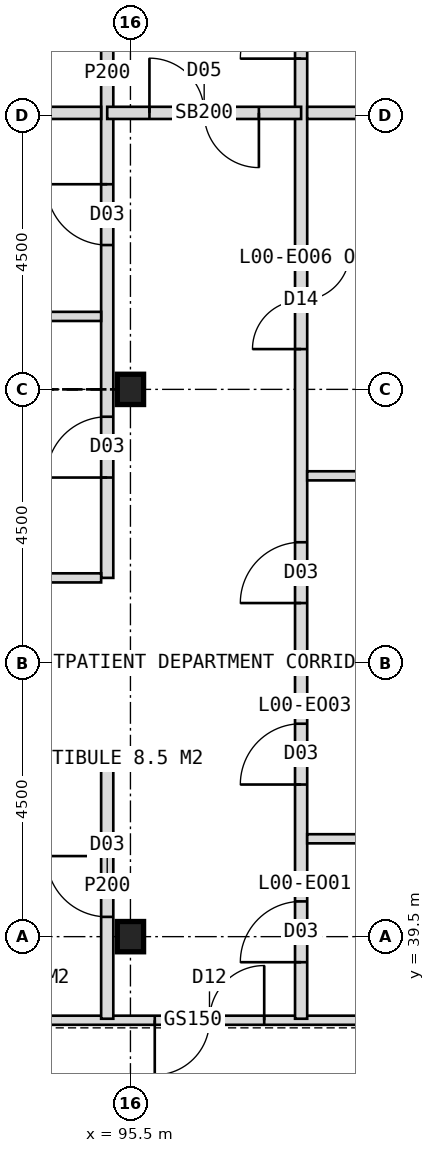
"""IFC4 building model, lengths in metres.
Left out: names, types, materials, properties, quantities, classifications, styles, units other than length and angle.
Written with IfcOpenShell. Run it as: python <this file> out.ifc"""

import sys

from ifc_helpers import new_model, si_unit, direction, frame, frame_2d, origin, origin_2d, place, context, subcontext, project, spatial, rectangle, i_section, extrude, element, fill, save


model = new_model("IFC4")
c1 = context("Model", 3, precision=1e-05, world=origin(), true_north=direction((0.0, 1.0)))
c2 = subcontext(c1, "Body", "Model", "MODEL_VIEW")
j1 = project(units=[si_unit("LENGTHUNIT", "METRE"), si_unit("PLANEANGLEUNIT", "RADIAN")], contexts=[c1])
p1 = place(None, origin())
s1 = spatial("IfcSite", under=j1, at=p1, CompositionType="ELEMENT")
p2 = place(p1, origin())
s2 = spatial("IfcBuilding", under=s1, at=p2, CompositionType="ELEMENT")
p3 = place(p2, origin())
s3 = spatial("IfcBuildingStorey", under=s2, at=p3, CompositionType="ELEMENT", Elevation=0.0)
for number, where, z_axis, x_axis in (
    (1, (95.5, 39.5, 0.0), (0.0, 0.0, 1.0), (1.0, 0.0, 0.0)),
    (2, (95.5, 48.5, 0.0), (0.0, 0.0, 1.0), (1.0, 0.0, 0.0)),
):
    element("IfcColumn", number, at=place(p3, frame(where, z_axis=z_axis, x_axis=x_axis)), inside=s3, PredefinedType="COLUMN", context=c2, shape_type="SweptSolid", body=[
        extrude(i_section(OverallWidth=0.432, OverallDepth=0.498, WebThickness=0.056, FlangeThickness=0.089, FilletRadius=0.015, at=origin_2d()), origin(), (0.0, 0.0, 1.0), 6.0),
    ])
p4 = place(p3, frame((86.5, 38.125, 0.0), z_axis=(0.0, 0.0, 1.0), x_axis=(1.0, 0.0, 0.0)))
e3 = element("IfcWall", 3, at=p4, inside=s3, PredefinedType="STANDARD", context=c2, shape_type="SweptSolid", body=[
    extrude(rectangle(XDim=20.053, YDim=0.15, at=frame_2d((10.027, 0.0))), origin(), (0.0, 0.0, 1.0), 5.1),
])
p5 = place(p4, frame((9.4, 0.0, 0.0)))
e4 = element("IfcOpeningElement", 4, at=p5, cuts=e3, PredefinedType="OPENING", context=c2, shape_type="SweptSolid", body=[
    extrude(rectangle(XDim=1.8, YDim=2.4, at=frame_2d((0.9, 1.2))), frame((0.0, 0.085, 0.0), z_axis=(0.0, -1.0, 0.0), x_axis=(1.0, 0.0, 0.0)), (0.0, 0.0, 1.0), 0.17),
])
p6 = place(p4, frame((0.322, 0.0, 0.6)))
e5 = element("IfcOpeningElement", 5, at=p6, cuts=e3, PredefinedType="OPENING", context=c2, shape_type="SweptSolid", body=[
    extrude(rectangle(XDim=2.4, YDim=3.0, at=frame_2d((1.2, 1.5))), frame((0.0, 0.085, 0.0), z_axis=(0.0, -1.0, 0.0), x_axis=(1.0, 0.0, 0.0)), (0.0, 0.0, 1.0), 0.17),
])
p7 = place(p4, frame((12.919, 0.0, 0.6)))
e6 = element("IfcOpeningElement", 6, at=p7, cuts=e3, PredefinedType="OPENING", context=c2, shape_type="SweptSolid", body=[
    extrude(rectangle(XDim=2.4, YDim=3.0, at=frame_2d((1.2, 1.5))), frame((0.0, 0.085, 0.0), z_axis=(0.0, -1.0, 0.0), x_axis=(1.0, 0.0, 0.0)), (0.0, 0.0, 1.0), 0.17),
])
p8 = place(p4, frame((17.654, 0.0, 0.6)))
e7 = element("IfcOpeningElement", 7, at=p8, cuts=e3, PredefinedType="OPENING", context=c2, shape_type="SweptSolid", body=[
    extrude(rectangle(XDim=2.4, YDim=3.0, at=frame_2d((1.2, 1.5))), frame((0.0, 0.085, 0.0), z_axis=(0.0, -1.0, 0.0), x_axis=(1.0, 0.0, 0.0)), (0.0, 0.0, 1.0), 0.17),
])
p9 = place(p3, frame((98.307, 38.15, 0.0), z_axis=(0.0, 0.0, 1.0), x_axis=(0.0, 1.0, 0.0)))
e8 = element("IfcWall", 8, at=p9, inside=s3, PredefinedType="PARTITIONING", context=c2, shape_type="SweptSolid", body=[
    extrude(rectangle(XDim=47.7, YDim=0.2, at=frame_2d((23.85, 0.0))), origin(), (0.0, 0.0, 1.0), 5.7),
])
p10 = place(p9, frame((45.7, 0.0, 0.0)))
e9 = element("IfcOpeningElement", 9, at=p10, cuts=e8, PredefinedType="OPENING", context=c2, shape_type="SweptSolid", body=[
    extrude(rectangle(XDim=1.2, YDim=2.1, at=frame_2d((0.6, 1.05))), frame((0.0, 0.11, 0.0), z_axis=(0.0, -1.0, 0.0), x_axis=(1.0, 0.0, 0.0)), (0.0, 0.0, 1.0), 0.22),
])
p11 = place(p9, frame((36.244, 0.0, 0.0)))
e10 = element("IfcOpeningElement", 10, at=p11, cuts=e8, PredefinedType="OPENING", context=c2, shape_type="SweptSolid", body=[
    extrude(rectangle(XDim=1.0, YDim=2.1, at=frame_2d((0.5, 1.05))), frame((0.0, 0.11, 0.0), z_axis=(0.0, -1.0, 0.0), x_axis=(1.0, 0.0, 0.0)), (0.0, 0.0, 1.0), 0.22),
])
p12 = place(p9, frame((0.93, 0.0, 0.0)))
e11 = element("IfcOpeningElement", 11, at=p12, cuts=e8, PredefinedType="OPENING", context=c2, shape_type="SweptSolid", body=[
    extrude(rectangle(XDim=1.0, YDim=2.1, at=frame_2d((0.5, 1.05))), frame((0.0, 0.11, 0.0), z_axis=(0.0, -1.0, 0.0), x_axis=(1.0, 0.0, 0.0)), (0.0, 0.0, 1.0), 0.22),
])
p13 = place(p9, frame((3.852, 0.0, 0.0)))
e12 = element("IfcOpeningElement", 12, at=p13, cuts=e8, PredefinedType="OPENING", context=c2, shape_type="SweptSolid", body=[
    extrude(rectangle(XDim=1.0, YDim=2.1, at=frame_2d((0.5, 1.05))), frame((0.0, 0.11, 0.0), z_axis=(0.0, -1.0, 0.0), x_axis=(1.0, 0.0, 0.0)), (0.0, 0.0, 1.0), 0.22),
])
p14 = place(p9, frame((6.836, 0.0, 0.0)))
e13 = element("IfcOpeningElement", 13, at=p14, cuts=e8, PredefinedType="OPENING", context=c2, shape_type="SweptSolid", body=[
    extrude(rectangle(XDim=1.0, YDim=2.1, at=frame_2d((0.5, 1.05))), frame((0.0, 0.11, 0.0), z_axis=(0.0, -1.0, 0.0), x_axis=(1.0, 0.0, 0.0)), (0.0, 0.0, 1.0), 0.22),
])
p15 = place(p9, frame((11.012, 0.0, 0.0)))
e14 = element("IfcOpeningElement", 14, at=p15, cuts=e8, PredefinedType="OPENING", context=c2, shape_type="SweptSolid", body=[
    extrude(rectangle(XDim=1.6, YDim=2.2, at=frame_2d((0.8, 1.1))), frame((0.0, 0.11, 0.0), z_axis=(0.0, -1.0, 0.0), x_axis=(1.0, 0.0, 0.0)), (0.0, 0.0, 1.0), 0.22),
])
p16 = place(p9, frame((15.789, 0.0, 0.0)))
e15 = element("IfcOpeningElement", 15, at=p16, cuts=e8, PredefinedType="OPENING", context=c2, shape_type="SweptSolid", body=[
    extrude(rectangle(XDim=1.0, YDim=2.1, at=frame_2d((0.5, 1.05))), frame((0.0, 0.11, 0.0), z_axis=(0.0, -1.0, 0.0), x_axis=(1.0, 0.0, 0.0)), (0.0, 0.0, 1.0), 0.22),
])
p17 = place(p9, frame((18.773, 0.0, 0.0)))
e16 = element("IfcOpeningElement", 16, at=p17, cuts=e8, PredefinedType="OPENING", context=c2, shape_type="SweptSolid", body=[
    extrude(rectangle(XDim=1.0, YDim=2.1, at=frame_2d((0.5, 1.05))), frame((0.0, 0.11, 0.0), z_axis=(0.0, -1.0, 0.0), x_axis=(1.0, 0.0, 0.0)), (0.0, 0.0, 1.0), 0.22),
])
p18 = place(p9, frame((22.95, 0.0, 0.0)))
e17 = element("IfcOpeningElement", 17, at=p18, cuts=e8, PredefinedType="OPENING", context=c2, shape_type="SweptSolid", body=[
    extrude(rectangle(XDim=1.6, YDim=2.2, at=frame_2d((0.8, 1.1))), frame((0.0, 0.11, 0.0), z_axis=(0.0, -1.0, 0.0), x_axis=(1.0, 0.0, 0.0)), (0.0, 0.0, 1.0), 0.22),
])
p19 = place(p9, frame((27.727, 0.0, 0.0)))
e18 = element("IfcOpeningElement", 18, at=p19, cuts=e8, PredefinedType="OPENING", context=c2, shape_type="SweptSolid", body=[
    extrude(rectangle(XDim=1.0, YDim=2.1, at=frame_2d((0.5, 1.05))), frame((0.0, 0.11, 0.0), z_axis=(0.0, -1.0, 0.0), x_axis=(1.0, 0.0, 0.0)), (0.0, 0.0, 1.0), 0.22),
])
p20 = place(p9, frame((30.711, 0.0, 0.0)))
e19 = element("IfcOpeningElement", 19, at=p20, cuts=e8, PredefinedType="OPENING", context=c2, shape_type="SweptSolid", body=[
    extrude(rectangle(XDim=1.0, YDim=2.1, at=frame_2d((0.5, 1.05))), frame((0.0, 0.11, 0.0), z_axis=(0.0, -1.0, 0.0), x_axis=(1.0, 0.0, 0.0)), (0.0, 0.0, 1.0), 0.22),
])
p21 = place(p9, frame((33.695, 0.0, 0.0)))
e20 = element("IfcOpeningElement", 20, at=p21, cuts=e8, PredefinedType="OPENING", context=c2, shape_type="SweptSolid", body=[
    extrude(rectangle(XDim=1.0, YDim=2.1, at=frame_2d((0.5, 1.05))), frame((0.0, 0.11, 0.0), z_axis=(0.0, -1.0, 0.0), x_axis=(1.0, 0.0, 0.0)), (0.0, 0.0, 1.0), 0.22),
])
p22 = place(p3, frame((95.118, 38.15, 0.0), z_axis=(0.0, 0.0, 1.0), x_axis=(0.0, 1.0, 0.0)))
e21 = element("IfcWall", 21, at=p22, inside=s3, PredefinedType="PARTITIONING", context=c2, shape_type="SweptSolid", body=[
    extrude(rectangle(XDim=4.35, YDim=0.2, at=frame_2d((2.175, 0.0))), origin(), (0.0, 0.0, 1.0), 5.7),
])
p23 = place(p22, frame((1.675, 0.0, 0.0)))
e22 = element("IfcOpeningElement", 22, at=p23, cuts=e21, PredefinedType="OPENING", context=c2, shape_type="SweptSolid", body=[
    extrude(rectangle(XDim=1.0, YDim=2.1, at=frame_2d((0.5, 1.05))), frame((0.0, 0.11, 0.0), z_axis=(0.0, -1.0, 0.0), x_axis=(1.0, 0.0, 0.0)), (0.0, 0.0, 1.0), 0.22),
])
p24 = place(p3, frame((95.118, 45.4, 0.0), z_axis=(0.0, 0.0, 1.0), x_axis=(0.0, 1.0, 0.0)))
e23 = element("IfcWall", 23, at=p24, inside=s3, PredefinedType="PARTITIONING", context=c2, shape_type="SweptSolid", body=[
    extrude(rectangle(XDim=16.6, YDim=0.2, at=frame_2d((8.3, 0.0))), origin(), (0.0, 0.0, 1.0), 5.7),
])
p25 = place(p24, frame((1.65, 0.0, 0.0)))
e24 = element("IfcOpeningElement", 24, at=p25, cuts=e23, PredefinedType="OPENING", context=c2, shape_type="SweptSolid", body=[
    extrude(rectangle(XDim=1.0, YDim=2.1, at=frame_2d((0.5, 1.05))), frame((0.0, 0.11, 0.0), z_axis=(0.0, -1.0, 0.0), x_axis=(1.0, 0.0, 0.0)), (0.0, 0.0, 1.0), 0.22),
])
p26 = place(p24, frame((5.473, 0.0, 0.0)))
e25 = element("IfcOpeningElement", 25, at=p26, cuts=e23, PredefinedType="OPENING", context=c2, shape_type="SweptSolid", body=[
    extrude(rectangle(XDim=1.0, YDim=2.1, at=frame_2d((0.5, 1.05))), frame((0.0, 0.11, 0.0), z_axis=(0.0, -1.0, 0.0), x_axis=(1.0, 0.0, 0.0)), (0.0, 0.0, 1.0), 0.22),
])
p27 = place(p24, frame((9.624, 0.0, 0.0)))
e26 = element("IfcOpeningElement", 26, at=p27, cuts=e23, PredefinedType="OPENING", context=c2, shape_type="SweptSolid", body=[
    extrude(rectangle(XDim=1.4, YDim=2.2, at=frame_2d((0.7, 1.1))), frame((0.0, 0.11, 0.0), z_axis=(0.0, -1.0, 0.0), x_axis=(1.0, 0.0, 0.0)), (0.0, 0.0, 1.0), 0.22),
])
p28 = place(p24, frame((14.0, 0.0, 0.0)))
e27 = element("IfcOpeningElement", 27, at=p28, cuts=e23, PredefinedType="OPENING", context=c2, shape_type="SweptSolid", body=[
    extrude(rectangle(XDim=1.6, YDim=2.2, at=frame_2d((0.8, 1.1))), frame((0.0, 0.11, 0.0), z_axis=(0.0, -1.0, 0.0), x_axis=(1.0, 0.0, 0.0)), (0.0, 0.0, 1.0), 0.22),
])
p29 = place(p3, frame((98.307, 53.047, 0.0), z_axis=(0.0, 0.0, 1.0), x_axis=(-1.0, 0.0, 0.0)))
e28 = element("IfcWall", 28, at=p29, inside=s3, PredefinedType="SOLIDWALL", context=c2, shape_type="SweptSolid", body=[
    extrude(rectangle(XDim=3.189, YDim=0.2, at=frame_2d((1.594, 0.0))), origin(), (0.0, 0.0, 1.0), 5.7),
])
p30 = place(p29, frame((0.695, 0.0, 0.0)))
e29 = element("IfcOpeningElement", 29, at=p30, cuts=e28, PredefinedType="OPENING", context=c2, shape_type="SweptSolid", body=[
    extrude(rectangle(XDim=1.8, YDim=2.2, at=frame_2d((0.9, 1.1))), frame((0.0, 0.11, 0.0), z_axis=(0.0, -1.0, 0.0), x_axis=(1.0, 0.0, 0.0)), (0.0, 0.0, 1.0), 0.22),
])
for number, where, z_axis, x_axis in (
    (30, (107.85, 41.109, 0.0), (0.0, 0.0, 1.0), (-1.0, 0.0, 0.0)),
    (31, (107.85, 44.094, 0.0), (0.0, 0.0, 1.0), (-1.0, 0.0, 0.0)),
    (32, (107.85, 47.078, 0.0), (0.0, 0.0, 1.0), (-1.0, 0.0, 0.0)),
):
    element("IfcWall", number, at=place(p3, frame(where, z_axis=z_axis, x_axis=x_axis)), inside=s3, PredefinedType="PARTITIONING", context=c2, shape_type="SweptSolid", body=[
        extrude(rectangle(XDim=9.443, YDim=0.15, at=frame_2d((4.722, 0.0))), origin(), (0.0, 0.0, 1.0), 5.7),
    ])
p31 = place(p3, frame((107.85, 53.047, 0.0), z_axis=(0.0, 0.0, 1.0), x_axis=(-1.0, 0.0, 0.0)))
e33 = element("IfcWall", 33, at=p31, inside=s3, PredefinedType="SOLIDWALL", context=c2, shape_type="SweptSolid", body=[
    extrude(rectangle(XDim=9.443, YDim=0.2, at=frame_2d((4.722, 0.0))), origin(), (0.0, 0.0, 1.0), 5.7),
])
p32 = place(p3, frame((95.018, 42.5, 0.0), z_axis=(0.0, 0.0, 1.0), x_axis=(-1.0, 0.0, 0.0)))
e34 = element("IfcWall", 34, at=p32, inside=s3, PredefinedType="PARTITIONING", context=c2, shape_type="SweptSolid", body=[
    extrude(rectangle(XDim=9.168, YDim=0.15, at=frame_2d((4.584, 0.0))), origin(), (0.0, 0.0, 1.0), 5.7),
])
p33 = place(p32, frame((6.434, 0.0, 0.0)))
e35 = element("IfcOpeningElement", 35, at=p33, cuts=e34, PredefinedType="OPENING", context=c2, shape_type="SweptSolid", body=[
    extrude(rectangle(XDim=0.9, YDim=2.1, at=frame_2d((0.45, 1.05))), frame((0.0, 0.085, 0.0), z_axis=(0.0, -1.0, 0.0), x_axis=(1.0, 0.0, 0.0)), (0.0, 0.0, 1.0), 0.17),
])
for number, where, z_axis, x_axis in (
    (36, (95.018, 45.4, 0.0), (0.0, 0.0, 1.0), (-1.0, 0.0, 0.0)),
    (37, (95.018, 49.7, 0.0), (0.0, 0.0, 1.0), (-1.0, 0.0, 0.0)),
):
    element("IfcWall", number, at=place(p3, frame(where, z_axis=z_axis, x_axis=x_axis)), inside=s3, PredefinedType="PARTITIONING", context=c2, shape_type="SweptSolid", body=[
        extrude(rectangle(XDim=9.168, YDim=0.15, at=frame_2d((4.584, 0.0))), origin(), (0.0, 0.0, 1.0), 5.7),
    ])
p34 = place(p3, frame((95.018, 53.047, 0.0), z_axis=(0.0, 0.0, 1.0), x_axis=(-1.0, 0.0, 0.0)))
e38 = element("IfcWall", 38, at=p34, inside=s3, PredefinedType="SOLIDWALL", context=c2, shape_type="SweptSolid", body=[
    extrude(rectangle(XDim=9.168, YDim=0.2, at=frame_2d((4.584, 0.0))), origin(), (0.0, 0.0, 1.0), 5.7),
])
p35 = place(p5, frame((1.8, 0.0, 0.0), z_axis=(0.0, 0.0, 1.0), x_axis=(-1.0, 0.0, 0.0)))
e39 = element("IfcDoor", 39, at=p35, inside=s3, OperationType="DOUBLE_DOOR_SINGLE_SWING", PredefinedType="DOOR", context=c2, shape_type="SweptSolid", body=[
    extrude(rectangle(XDim=1.8, YDim=2.4, at=frame_2d((0.9, 1.2))), frame((0.0, 0.025, 0.0), z_axis=(0.0, -1.0, 0.0), x_axis=(1.0, 0.0, 0.0)), (0.0, 0.0, 1.0), 0.05),
])
fill(e4, e39)
p36 = place(p30, origin())
e40 = element("IfcDoor", 40, at=p36, inside=s3, OperationType="DOUBLE_DOOR_DOUBLE_SWING", PredefinedType="DOOR", context=c2, shape_type="SweptSolid", body=[
    extrude(rectangle(XDim=1.8, YDim=2.2, at=frame_2d((0.9, 1.1))), frame((0.0, 0.025, 0.0), z_axis=(0.0, -1.0, 0.0), x_axis=(1.0, 0.0, 0.0)), (0.0, 0.0, 1.0), 0.05),
])
fill(e29, e40)
p37 = place(p12, origin())
e41 = element("IfcDoor", 41, at=p37, inside=s3, OperationType="SINGLE_SWING_LEFT", PredefinedType="DOOR", context=c2, shape_type="SweptSolid", body=[
    extrude(rectangle(XDim=1.0, YDim=2.1, at=frame_2d((0.5, 1.05))), frame((0.0, 0.025, 0.0), z_axis=(0.0, -1.0, 0.0), x_axis=(1.0, 0.0, 0.0)), (0.0, 0.0, 1.0), 0.05),
])
fill(e11, e41)
p38 = place(p13, origin())
e42 = element("IfcDoor", 42, at=p38, inside=s3, OperationType="SINGLE_SWING_LEFT", PredefinedType="DOOR", context=c2, shape_type="SweptSolid", body=[
    extrude(rectangle(XDim=1.0, YDim=2.1, at=frame_2d((0.5, 1.05))), frame((0.0, 0.025, 0.0), z_axis=(0.0, -1.0, 0.0), x_axis=(1.0, 0.0, 0.0)), (0.0, 0.0, 1.0), 0.05),
])
fill(e12, e42)
p39 = place(p14, origin())
e43 = element("IfcDoor", 43, at=p39, inside=s3, OperationType="SINGLE_SWING_LEFT", PredefinedType="DOOR", context=c2, shape_type="SweptSolid", body=[
    extrude(rectangle(XDim=1.0, YDim=2.1, at=frame_2d((0.5, 1.05))), frame((0.0, 0.025, 0.0), z_axis=(0.0, -1.0, 0.0), x_axis=(1.0, 0.0, 0.0)), (0.0, 0.0, 1.0), 0.05),
])
fill(e13, e43)
p40 = place(p15, origin())
e44 = element("IfcDoor", 44, at=p40, inside=s3, OperationType="DOUBLE_DOOR_DOUBLE_SWING", PredefinedType="DOOR", context=c2, shape_type="SweptSolid", body=[
    extrude(rectangle(XDim=1.6, YDim=2.2, at=frame_2d((0.8, 1.1))), frame((0.0, 0.025, 0.0), z_axis=(0.0, -1.0, 0.0), x_axis=(1.0, 0.0, 0.0)), (0.0, 0.0, 1.0), 0.05),
])
fill(e14, e44)
p41 = place(p16, origin())
e45 = element("IfcDoor", 45, at=p41, inside=s3, OperationType="SINGLE_SWING_LEFT", PredefinedType="DOOR", context=c2, shape_type="SweptSolid", body=[
    extrude(rectangle(XDim=1.0, YDim=2.1, at=frame_2d((0.5, 1.05))), frame((0.0, 0.025, 0.0), z_axis=(0.0, -1.0, 0.0), x_axis=(1.0, 0.0, 0.0)), (0.0, 0.0, 1.0), 0.05),
])
fill(e15, e45)
p42 = place(p23, origin())
e46 = element("IfcDoor", 46, at=p42, inside=s3, OperationType="SINGLE_SWING_RIGHT", PredefinedType="DOOR", context=c2, shape_type="SweptSolid", body=[
    extrude(rectangle(XDim=1.0, YDim=2.1, at=frame_2d((0.5, 1.05))), frame((0.0, 0.025, 0.0), z_axis=(0.0, -1.0, 0.0), x_axis=(1.0, 0.0, 0.0)), (0.0, 0.0, 1.0), 0.05),
])
fill(e22, e46)
p43 = place(p25, origin())
e47 = element("IfcDoor", 47, at=p43, inside=s3, OperationType="SINGLE_SWING_LEFT", PredefinedType="DOOR", context=c2, shape_type="SweptSolid", body=[
    extrude(rectangle(XDim=1.0, YDim=2.1, at=frame_2d((0.5, 1.05))), frame((0.0, 0.025, 0.0), z_axis=(0.0, -1.0, 0.0), x_axis=(1.0, 0.0, 0.0)), (0.0, 0.0, 1.0), 0.05),
])
fill(e24, e47)
p44 = place(p26, origin())
e48 = element("IfcDoor", 48, at=p44, inside=s3, OperationType="SINGLE_SWING_RIGHT", PredefinedType="DOOR", context=c2, shape_type="SweptSolid", body=[
    extrude(rectangle(XDim=1.0, YDim=2.1, at=frame_2d((0.5, 1.05))), frame((0.0, 0.025, 0.0), z_axis=(0.0, -1.0, 0.0), x_axis=(1.0, 0.0, 0.0)), (0.0, 0.0, 1.0), 0.05),
])
fill(e25, e48)
save(model, sys.argv[1])
